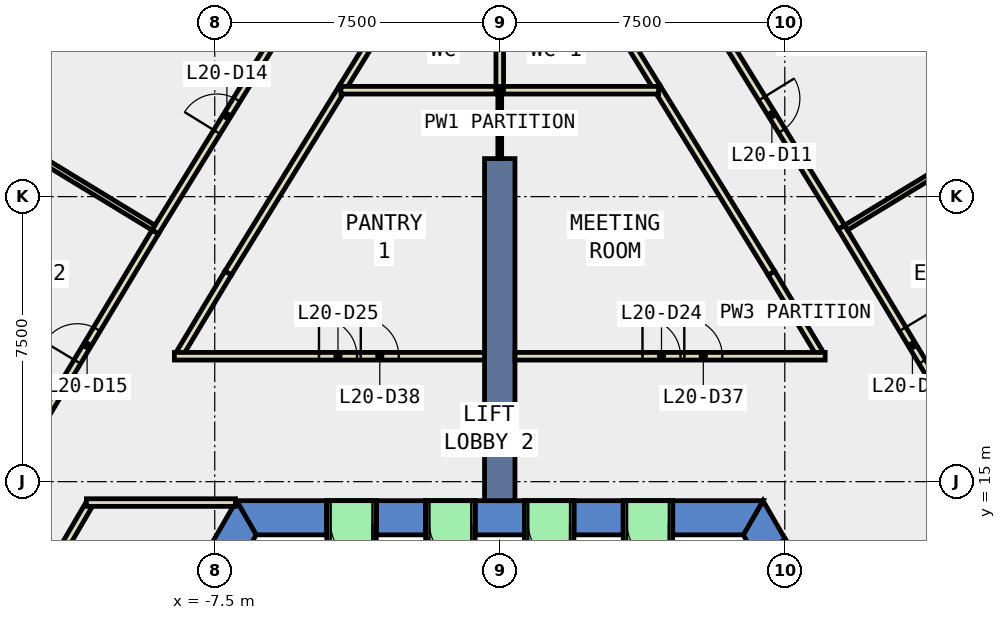
"""IFC4 building model, lengths in metres.
Left out: names, types, materials, properties, quantities, classifications, styles, units other than length and angle.
Written with IfcOpenShell. Run it as: python <this file> out.ifc"""

import sys

from ifc_helpers import new_model, si_unit, direction, frame, frame_2d, origin, place, context, subcontext, project, spatial, polyline, rectangle, outline, extrude, element, fill, save


model = new_model("IFC4")
c1 = context("Model", 3, precision=1e-05, world=origin(), true_north=direction((0.0, 1.0)))
c2 = subcontext(c1, "Body", "Model", "MODEL_VIEW")
j1 = project(units=[si_unit("LENGTHUNIT", "METRE"), si_unit("PLANEANGLEUNIT", "RADIAN")], contexts=[c1])
p1 = place(None, origin())
s1 = spatial("IfcSite", under=j1, at=p1, CompositionType="ELEMENT")
p2 = place(p1, origin())
s2 = spatial("IfcBuilding", under=s1, at=p2, CompositionType="ELEMENT")
p3 = place(p2, frame((0.0, 0.0, 95.0)))
s3 = spatial("IfcBuildingStorey", under=s2, at=p3, CompositionType="ELEMENT", Elevation=95.0)
p4 = place(p3, frame((0.0, 0.0, -0.4)))
e1 = element("IfcWall", 1, at=p4, inside=s3, PredefinedType="SHEAR", context=c2, shape_type="SweptSolid", body=[
    extrude(outline(polyline([(6.738, 13.03), (7.517, 13.48), (6.928, 14.5), (6.409, 13.6), (6.738, 13.03)])), origin(), (0.0, 0.0, 1.0), 4.2),
])
p5 = place(p3, frame((0.0, 0.0, 3.6)))
e2 = element("IfcWall", 2, at=p5, inside=s3, PredefinedType="SHEAR", context=c2, shape_type="SweptSolid", body=[
    extrude(outline(polyline([(7.517, 13.48), (6.738, 13.03), (7.738, 11.298), (8.517, 11.748), (7.517, 13.48)])), origin(), (0.0, 0.0, 1.0), 0.2),
])
p6 = place(p3, frame((0.0, 0.0, -0.4)))
e3 = element("IfcWall", 3, at=p6, inside=s3, PredefinedType="SHEAR", context=c2, shape_type="SweptSolid", body=[
    extrude(outline(polyline([(4.55, 14.5), (4.55, 13.6), (6.409, 13.6), (6.928, 14.5), (4.55, 14.5)])), origin(), (0.0, 0.0, 1.0), 4.2),
])
p7 = place(p3, frame((0.0, 0.0, -0.4)))
e4 = element("IfcWall", 4, at=p7, inside=s3, PredefinedType="SHEAR", context=c2, shape_type="SweptSolid", body=[
    extrude(outline(polyline([(1.95, 14.5), (1.95, 13.6), (3.25, 13.6), (3.25, 14.5), (1.95, 14.5)])), origin(), (0.0, 0.0, 1.0), 4.2),
])
p8 = place(p3, frame((0.0, 0.0, -0.4)))
e5 = element("IfcWall", 5, at=p8, inside=s3, PredefinedType="SHEAR", context=c2, shape_type="SweptSolid", body=[
    extrude(outline(polyline([(-0.65, 14.5), (-0.65, 13.6), (0.65, 13.6), (0.65, 14.5), (-0.65, 14.5)])), origin(), (0.0, 0.0, 1.0), 4.2),
])
p9 = place(p3, frame((0.0, 0.0, -0.4)))
e6 = element("IfcWall", 6, at=p9, inside=s3, PredefinedType="SHEAR", context=c2, shape_type="SweptSolid", body=[
    extrude(outline(polyline([(-3.25, 14.5), (-3.25, 13.6), (-1.95, 13.6), (-1.95, 14.5), (-3.25, 14.5)])), origin(), (0.0, 0.0, 1.0), 4.2),
])
p10 = place(p3, frame((0.0, 0.0, -0.4)))
e7 = element("IfcWall", 7, at=p10, inside=s3, PredefinedType="SHEAR", context=c2, shape_type="SweptSolid", body=[
    extrude(outline(polyline([(-4.55, 13.6), (-4.55, 14.5), (-6.928, 14.5), (-6.409, 13.6), (-4.55, 13.6)])), origin(), (0.0, 0.0, 1.0), 4.2),
])
p11 = place(p3, frame((0.0, 0.0, 3.6)))
e8 = element("IfcWall", 8, at=p11, inside=s3, PredefinedType="SHEAR", context=c2, shape_type="SweptSolid", body=[
    extrude(outline(polyline([(3.25, 14.5), (3.25, 13.6), (4.55, 13.6), (4.55, 14.5), (3.25, 14.5)])), origin(), (0.0, 0.0, 1.0), 0.2),
])
p12 = place(p3, frame((0.0, 0.0, 3.6)))
e9 = element("IfcWall", 9, at=p12, inside=s3, PredefinedType="SHEAR", context=c2, shape_type="SweptSolid", body=[
    extrude(outline(polyline([(0.65, 14.5), (0.65, 13.6), (1.95, 13.6), (1.95, 14.5), (0.65, 14.5)])), origin(), (0.0, 0.0, 1.0), 0.2),
])
p13 = place(p3, frame((0.0, 0.0, 3.6)))
e10 = element("IfcWall", 10, at=p13, inside=s3, PredefinedType="SHEAR", context=c2, shape_type="SweptSolid", body=[
    extrude(outline(polyline([(-1.95, 14.5), (-1.95, 13.6), (-0.65, 13.6), (-0.65, 14.5), (-1.95, 14.5)])), origin(), (0.0, 0.0, 1.0), 0.2),
])
p14 = place(p3, frame((0.0, 0.0, 3.6)))
e11 = element("IfcWall", 11, at=p14, inside=s3, PredefinedType="SHEAR", context=c2, shape_type="SweptSolid", body=[
    extrude(outline(polyline([(-4.55, 14.5), (-4.55, 13.6), (-3.25, 13.6), (-3.25, 14.5), (-4.55, 14.5)])), origin(), (0.0, 0.0, 1.0), 0.2),
])
p15 = place(p3, frame((0.0, 0.0, -0.4)))
e12 = element("IfcWall", 12, at=p15, inside=s3, PredefinedType="SHEAR", context=c2, shape_type="SweptSolid", body=[
    extrude(outline(polyline([(-12.267, 5.252), (-11.488, 4.802), (-6.409, 13.6), (-6.928, 14.5), (-12.267, 5.252)])), origin(), (0.0, 0.0, 1.0), 4.2),
])
p16 = place(p3, frame((0.0, 14.5, -0.4), z_axis=(0.0, 0.0, 1.0), x_axis=(0.0, 1.0, 0.0)))
e13 = element("IfcWall", 13, at=p16, inside=s3, PredefinedType="SHEAR", context=c2, shape_type="SweptSolid", body=[
    extrude(rectangle(XDim=9.0, YDim=0.8, at=frame_2d((4.5, 0.0))), origin(), (0.0, 0.0, 1.0), 4.2),
])
p17 = place(p3, frame((-11.814, 31.112, 0.0), z_axis=(0.0, 0.0, 1.0), x_axis=(-0.525204788886, -0.850975869065, 0.0)))
e14 = element("IfcWall", 14, at=p17, inside=s3, PredefinedType="STANDARD", context=c2, shape_type="SweptSolid", body=[
    extrude(rectangle(XDim=6.099, YDim=0.3, at=frame_2d((3.049, 0.0))), origin(), (0.0, 0.0, 1.0), 3.8),
])
p18 = place(p17, frame((0.525, 0.0, 0.9)))
e15 = element("IfcOpeningElement", 15, at=p18, cuts=e14, PredefinedType="OPENING", context=c2, shape_type="SweptSolid", body=[
    extrude(rectangle(XDim=2.0, YDim=2.6, at=frame_2d((1.0, 1.3))), frame((0.0, 0.16, 0.0), z_axis=(0.0, -1.0, 0.0), x_axis=(1.0, 0.0, 0.0)), (0.0, 0.0, 1.0), 0.32),
])
p19 = place(p17, frame((3.574, 0.0, 0.9)))
e16 = element("IfcOpeningElement", 16, at=p19, cuts=e14, PredefinedType="OPENING", context=c2, shape_type="SweptSolid", body=[
    extrude(rectangle(XDim=2.0, YDim=2.6, at=frame_2d((1.0, 1.3))), frame((0.0, 0.16, 0.0), z_axis=(0.0, -1.0, 0.0), x_axis=(1.0, 0.0, 0.0)), (0.0, 0.0, 1.0), 0.32),
])
p20 = place(p3, frame((8.411, 18.386, 0.0), z_axis=(0.0, 0.0, 1.0), x_axis=(-0.515008089027, 0.857185317325, 0.0)))
e17 = element("IfcWall", 17, at=p20, inside=s3, PredefinedType="PARTITIONING", context=c2, shape_type="SweptSolid", body=[
    extrude(rectangle(XDim=2.452, YDim=0.2, at=frame_2d((1.226, 0.0))), origin(), (0.0, 0.0, 1.0), 3.8),
])
for number, where, z_axis, x_axis in (
    (18, (7.148, 20.488, 0.0), (0.0, 0.0, 1.0), (-0.525, 0.851, 0.0)),
    (19, (-4.126, 25.385, 0.0), (0.0, 0.0, 1.0), (-0.525, -0.851, 0.0)),
):
    element("IfcWall", number, at=place(p3, frame(where, z_axis=z_axis, x_axis=x_axis)), inside=s3, PredefinedType="PARTITIONING", context=c2, shape_type="SweptSolid", body=[
        extrude(rectangle(XDim=5.754, YDim=0.2, at=frame_2d((2.877, 0.0))), origin(), (0.0, 0.0, 1.0), 3.8),
    ])
p21 = place(p3, frame((-7.148, 20.488, 0.0), z_axis=(0.0, 0.0, 1.0), x_axis=(-0.515008089027, -0.857185317325, 0.0)))
e20 = element("IfcWall", 20, at=p21, inside=s3, PredefinedType="PARTITIONING", context=c2, shape_type="SweptSolid", body=[
    extrude(rectangle(XDim=2.452, YDim=0.2, at=frame_2d((1.226, 0.0))), origin(), (0.0, 0.0, 1.0), 3.8),
])
p22 = place(p3, frame((-10.797, 14.415, 0.0), z_axis=(0.0, 0.0, 1.0), x_axis=(-0.505008297342, -0.863114488128, 0.0)))
e21 = element("IfcWall", 21, at=p22, inside=s3, PredefinedType="PARTITIONING", context=c2, shape_type="SweptSolid", body=[
    extrude(rectangle(XDim=7.085, YDim=0.2, at=frame_2d((3.542, 0.0))), origin(), (0.0, 0.0, 1.0), 3.8),
])
p23 = place(p22, frame((3.043, 0.0, 0.0)))
e22 = element("IfcOpeningElement", 22, at=p23, cuts=e21, PredefinedType="OPENING", context=c2, shape_type="SweptSolid", body=[
    extrude(rectangle(XDim=1.0, YDim=2.1, at=frame_2d((0.5, 1.05))), frame((0.0, 0.11, 0.0), z_axis=(0.0, -1.0, 0.0), x_axis=(1.0, 0.0, 0.0)), (0.0, 0.0, 1.0), 0.22),
])
for number, where, z_axis, x_axis in (
    (23, (4.126, 25.385, 0.0), (0.0, 0.0, 1.0), (-0.525, 0.851, 0.0)),
    (24, (-3.428, 26.517, 0.0), (0.0, 0.0, 1.0), (-0.525, -0.851, 0.0)),
):
    element("IfcWall", number, at=place(p3, frame(where, z_axis=z_axis, x_axis=x_axis)), inside=s3, PredefinedType="PARTITIONING", context=c2, shape_type="SweptSolid", body=[
        extrude(rectangle(XDim=1.33, YDim=0.2, at=frame_2d((0.665, 0.0))), origin(), (0.0, 0.0, 1.0), 3.8),
    ])
p24 = place(p3, frame((8.989, 21.696, 0.0), z_axis=(0.0, 0.0, 1.0), x_axis=(0.515000602442, -0.857189815318, 0.0)))
e25 = element("IfcWall", 25, at=p24, inside=s3, PredefinedType="PARTITIONING", context=c2, shape_type="SweptSolid", body=[
    extrude(rectangle(XDim=7.11, YDim=0.2, at=frame_2d((3.555, 0.0))), origin(), (0.0, 0.0, 1.0), 3.8),
])
p25 = place(p24, frame((3.13, 0.0, 0.0)))
e26 = element("IfcOpeningElement", 26, at=p25, cuts=e25, PredefinedType="OPENING", context=c2, shape_type="SweptSolid", body=[
    extrude(rectangle(XDim=1.0, YDim=2.1, at=frame_2d((0.5, 1.05))), frame((0.0, 0.11, 0.0), z_axis=(0.0, -1.0, 0.0), x_axis=(1.0, 0.0, 0.0)), (0.0, 0.0, 1.0), 0.22),
])
p26 = place(p3, frame((5.254, 27.747, 0.0), z_axis=(0.0, 0.0, 1.0), x_axis=(0.52516023635, -0.851003364363, 0.0)))
e27 = element("IfcWall", 27, at=p26, inside=s3, PredefinedType="PARTITIONING", context=c2, shape_type="SweptSolid", body=[
    extrude(rectangle(XDim=7.11, YDim=0.2, at=frame_2d((3.555, 0.0))), origin(), (0.0, 0.0, 1.0), 3.8),
])
p27 = place(p26, frame((3.13, 0.0, 0.0)))
e28 = element("IfcOpeningElement", 28, at=p27, cuts=e27, PredefinedType="OPENING", context=c2, shape_type="SweptSolid", body=[
    extrude(rectangle(XDim=1.0, YDim=2.1, at=frame_2d((0.5, 1.05))), frame((0.0, 0.11, 0.0), z_axis=(0.0, -1.0, 0.0), x_axis=(1.0, 0.0, 0.0)), (0.0, 0.0, 1.0), 0.22),
])
p28 = place(p3, frame((-9.067, 21.568, 0.0), z_axis=(0.0, 0.0, 1.0), x_axis=(0.525131931126, 0.851020831068, 0.0)))
e29 = element("IfcWall", 29, at=p28, inside=s3, PredefinedType="PARTITIONING", context=c2, shape_type="SweptSolid", body=[
    extrude(rectangle(XDim=7.187, YDim=0.2, at=frame_2d((3.593, 0.0))), origin(), (0.0, 0.0, 1.0), 3.8),
])
p29 = place(p28, frame((3.093, 0.0, 0.0)))
e30 = element("IfcOpeningElement", 30, at=p29, cuts=e29, PredefinedType="OPENING", context=c2, shape_type="SweptSolid", body=[
    extrude(rectangle(XDim=1.0, YDim=2.1, at=frame_2d((0.5, 1.05))), frame((0.0, 0.11, 0.0), z_axis=(0.0, -1.0, 0.0), x_axis=(1.0, 0.0, 0.0)), (0.0, 0.0, 1.0), 0.22),
])
p30 = place(p3, frame((-12.728, 15.473, 0.0), z_axis=(0.0, 0.0, 1.0), x_axis=(0.515010673306, 0.857183764651, 0.0)))
e31 = element("IfcWall", 31, at=p30, inside=s3, PredefinedType="PARTITIONING", context=c2, shape_type="SweptSolid", body=[
    extrude(rectangle(XDim=7.111, YDim=0.2, at=frame_2d((3.555, 0.0))), origin(), (0.0, 0.0, 1.0), 3.8),
])
p31 = place(p30, frame((3.13, 0.0, 0.0)))
e32 = element("IfcOpeningElement", 32, at=p31, cuts=e31, PredefinedType="OPENING", context=c2, shape_type="SweptSolid", body=[
    extrude(rectangle(XDim=1.0, YDim=2.1, at=frame_2d((0.5, 1.05))), frame((0.0, 0.11, 0.0), z_axis=(0.0, -1.0, 0.0), x_axis=(1.0, 0.0, 0.0)), (0.0, 0.0, 1.0), 0.22),
])
p32 = place(p3, frame((0.4, 18.3, 0.0), z_axis=(0.0, 0.0, 1.0), x_axis=(1.0, 0.0, 0.0)))
e33 = element("IfcWall", 33, at=p32, inside=s3, PredefinedType="PARTITIONING", context=c2, shape_type="SweptSolid", body=[
    extrude(rectangle(XDim=8.163, YDim=0.2, at=frame_2d((4.082, 0.0))), origin(), (0.0, 0.0, 1.0), 3.8),
])
p33 = place(p32, frame((3.356, 0.0, 0.0)))
e34 = element("IfcOpeningElement", 34, at=p33, cuts=e33, PredefinedType="OPENING", context=c2, shape_type="SweptSolid", body=[
    extrude(rectangle(XDim=1.0, YDim=2.1, at=frame_2d((0.5, 1.05))), frame((0.0, 0.11, 0.0), z_axis=(0.0, -1.0, 0.0), x_axis=(1.0, 0.0, 0.0)), (0.0, 0.0, 1.0), 0.22),
])
p34 = place(p32, frame((4.456, 0.0, 0.0)))
e35 = element("IfcOpeningElement", 35, at=p34, cuts=e33, PredefinedType="OPENING", context=c2, shape_type="SweptSolid", body=[
    extrude(rectangle(XDim=1.0, YDim=2.1, at=frame_2d((0.5, 1.05))), frame((0.0, 0.11, 0.0), z_axis=(0.0, -1.0, 0.0), x_axis=(1.0, 0.0, 0.0)), (0.0, 0.0, 1.0), 0.22),
])
p35 = place(p3, frame((-8.563, 18.3, 0.0), z_axis=(0.0, 0.0, 1.0), x_axis=(1.0, 0.0, 0.0)))
e36 = element("IfcWall", 36, at=p35, inside=s3, PredefinedType="PARTITIONING", context=c2, shape_type="SweptSolid", body=[
    extrude(rectangle(XDim=8.163, YDim=0.2, at=frame_2d((4.082, 0.0))), origin(), (0.0, 0.0, 1.0), 3.8),
])
p36 = place(p35, frame((3.806, 0.0, 0.0)))
e37 = element("IfcOpeningElement", 37, at=p36, cuts=e36, PredefinedType="OPENING", context=c2, shape_type="SweptSolid", body=[
    extrude(rectangle(XDim=1.0, YDim=2.1, at=frame_2d((0.5, 1.05))), frame((0.0, 0.11, 0.0), z_axis=(0.0, -1.0, 0.0), x_axis=(1.0, 0.0, 0.0)), (0.0, 0.0, 1.0), 0.22),
])
p37 = place(p35, frame((4.906, 0.0, 0.0)))
e38 = element("IfcOpeningElement", 38, at=p37, cuts=e36, PredefinedType="OPENING", context=c2, shape_type="SweptSolid", body=[
    extrude(rectangle(XDim=1.0, YDim=2.1, at=frame_2d((0.5, 1.05))), frame((0.0, 0.11, 0.0), z_axis=(0.0, -1.0, 0.0), x_axis=(1.0, 0.0, 0.0)), (0.0, 0.0, 1.0), 0.22),
])
p38 = place(p3, frame((-6.957, 14.45, 0.0), z_axis=(0.0, 0.0, 1.0), x_axis=(-1.0, 0.0, 0.0)))
e39 = element("IfcWall", 39, at=p38, inside=s3, PredefinedType="PARTITIONING", context=c2, shape_type="SweptSolid", body=[
    extrude(rectangle(XDim=3.92, YDim=0.2, at=frame_2d((1.96, 0.0))), origin(), (0.0, 0.0, 1.0), 3.8),
])
p39 = place(p3, frame((0.0, 23.5, 0.0), z_axis=(0.0, 0.0, 1.0), x_axis=(0.0, 1.0, 0.0)))
e40 = element("IfcWall", 40, at=p39, inside=s3, PredefinedType="PARTITIONING", context=c2, shape_type="SweptSolid", body=[
    extrude(rectangle(XDim=1.9, YDim=0.1, at=frame_2d((0.95, 0.0))), origin(), (0.0, 0.0, 1.0), 3.8),
])
for number, where, z_axis, x_axis in (
    (41, (0.1, 25.3, 0.0), (0.0, 0.0, 1.0), (1.0, 0.0, 0.0)),
    (42, (-4.179, 25.3, 0.0), (0.0, 0.0, 1.0), (1.0, 0.0, 0.0)),
):
    element("IfcWall", number, at=place(p3, frame(where, z_axis=z_axis, x_axis=x_axis)), inside=s3, PredefinedType="PARTITIONING", context=c2, shape_type="SweptSolid", body=[
        extrude(rectangle(XDim=4.079, YDim=0.2, at=frame_2d((2.04, 0.0))), origin(), (0.0, 0.0, 1.0), 3.8),
    ])
p40 = place(p3, frame((0.0, 25.4, 0.0), z_axis=(0.0, 0.0, 1.0), x_axis=(0.0, 1.0, 0.0)))
e43 = element("IfcWall", 43, at=p40, inside=s3, PredefinedType="PARTITIONING", context=c2, shape_type="SweptSolid", body=[
    extrude(rectangle(XDim=6.453, YDim=0.2, at=frame_2d((3.227, 0.0))), origin(), (0.0, 0.0, 1.0), 3.8),
])
for number, where, z_axis, x_axis in (
    (44, (9.113, 21.684, 0.0), (0.0, 0.0, 1.0), (0.854, 0.52, 0.0)),
    (45, (-9.113, 21.684, 0.0), (0.0, 0.0, 1.0), (-0.854, 0.52, 0.0)),
):
    element("IfcWall", number, at=place(p3, frame(where, z_axis=z_axis, x_axis=x_axis)), inside=s3, PredefinedType="PARTITIONING", context=c2, shape_type="SweptSolid", body=[
        extrude(rectangle(XDim=5.729, YDim=0.15, at=frame_2d((2.865, 0.0))), origin(), (0.0, 0.0, 1.0), 3.8),
    ])
p41 = place(p3, frame((8.43, 11.698, 0.0), z_axis=(0.0, 0.0, 1.0), x_axis=(-0.50002537861, 0.866010750942, 0.0)))
e46 = element("IfcWall", 46, at=p41, inside=s3, PredefinedType="PARTITIONING", context=c2, shape_type="SweptSolid", body=[
    extrude(rectangle(XDim=2.0, YDim=0.2, at=frame_2d((1.0, 0.0))), origin(), (0.0, 0.0, 1.0), 2.4),
])
p42 = place(p41, frame((0.19, 0.0, 0.0)))
e47 = element("IfcOpeningElement", 47, at=p42, cuts=e46, PredefinedType="OPENING", context=c2, shape_type="SweptSolid", body=[
    extrude(rectangle(XDim=1.8, YDim=2.1, at=frame_2d((0.9, 1.05))), frame((0.0, 0.11, 0.0), z_axis=(0.0, -1.0, 0.0), x_axis=(1.0, 0.0, 0.0)), (0.0, 0.0, 1.0), 0.22),
])
p43 = place(p3, frame((4.55, 13.9, 0.0), z_axis=(0.0, 0.0, 1.0), x_axis=(-1.0, 0.0, 0.0)))
e48 = element("IfcWall", 48, at=p43, inside=s3, PredefinedType="STANDARD", context=c2, shape_type="SweptSolid", body=[
    extrude(rectangle(XDim=1.3, YDim=1.2, at=frame_2d((0.65, 0.0))), origin(), (0.0, 0.0, 1.0), 2.4),
])
p44 = place(p43, frame((0.1, 0.0, 0.0)))
e49 = element("IfcOpeningElement", 49, at=p44, cuts=e48, PredefinedType="OPENING", context=c2, shape_type="SweptSolid", body=[
    extrude(rectangle(XDim=1.1, YDim=2.3, at=frame_2d((0.55, 1.15))), frame((0.0, 0.61, 0.0), z_axis=(0.0, -1.0, 0.0), x_axis=(1.0, 0.0, 0.0)), (0.0, 0.0, 1.0), 1.22),
])
p45 = place(p3, frame((1.95, 13.9, 0.0), z_axis=(0.0, 0.0, 1.0), x_axis=(-1.0, 0.0, 0.0)))
e50 = element("IfcWall", 50, at=p45, inside=s3, PredefinedType="STANDARD", context=c2, shape_type="SweptSolid", body=[
    extrude(rectangle(XDim=1.3, YDim=1.2, at=frame_2d((0.65, 0.0))), origin(), (0.0, 0.0, 1.0), 2.4),
])
p46 = place(p45, frame((0.1, 0.0, 0.0)))
e51 = element("IfcOpeningElement", 51, at=p46, cuts=e50, PredefinedType="OPENING", context=c2, shape_type="SweptSolid", body=[
    extrude(rectangle(XDim=1.1, YDim=2.3, at=frame_2d((0.55, 1.15))), frame((0.0, 0.61, 0.0), z_axis=(0.0, -1.0, 0.0), x_axis=(1.0, 0.0, 0.0)), (0.0, 0.0, 1.0), 1.22),
])
p47 = place(p3, frame((-0.65, 13.9, 0.0), z_axis=(0.0, 0.0, 1.0), x_axis=(-1.0, 0.0, 0.0)))
e52 = element("IfcWall", 52, at=p47, inside=s3, PredefinedType="STANDARD", context=c2, shape_type="SweptSolid", body=[
    extrude(rectangle(XDim=1.3, YDim=1.2, at=frame_2d((0.65, 0.0))), origin(), (0.0, 0.0, 1.0), 2.4),
])
p48 = place(p47, frame((0.1, 0.0, 0.0)))
e53 = element("IfcOpeningElement", 53, at=p48, cuts=e52, PredefinedType="OPENING", context=c2, shape_type="SweptSolid", body=[
    extrude(rectangle(XDim=1.1, YDim=2.3, at=frame_2d((0.55, 1.15))), frame((0.0, 0.61, 0.0), z_axis=(0.0, -1.0, 0.0), x_axis=(1.0, 0.0, 0.0)), (0.0, 0.0, 1.0), 1.22),
])
p49 = place(p3, frame((-3.25, 13.9, 0.0), z_axis=(0.0, 0.0, 1.0), x_axis=(-1.0, 0.0, 0.0)))
e54 = element("IfcWall", 54, at=p49, inside=s3, PredefinedType="STANDARD", context=c2, shape_type="SweptSolid", body=[
    extrude(rectangle(XDim=1.3, YDim=1.2, at=frame_2d((0.65, 0.0))), origin(), (0.0, 0.0, 1.0), 2.4),
])
p50 = place(p49, frame((0.1, 0.0, 0.0)))
e55 = element("IfcOpeningElement", 55, at=p50, cuts=e54, PredefinedType="OPENING", context=c2, shape_type="SweptSolid", body=[
    extrude(rectangle(XDim=1.1, YDim=2.3, at=frame_2d((0.55, 1.15))), frame((0.0, 0.61, 0.0), z_axis=(0.0, -1.0, 0.0), x_axis=(1.0, 0.0, 0.0)), (0.0, 0.0, 1.0), 1.22),
])
p51 = place(p25, origin())
e56 = element("IfcDoor", 56, at=p51, inside=s3, OperationType="SINGLE_SWING_LEFT", PredefinedType="DOOR", context=c2, shape_type="SweptSolid", body=[
    extrude(rectangle(XDim=1.0, YDim=2.1, at=frame_2d((0.5, 1.05))), frame((0.0, 0.025, 0.0), z_axis=(0.0, -1.0, 0.0), x_axis=(1.0, 0.0, 0.0)), (0.0, 0.0, 1.0), 0.05),
])
fill(e26, e56)
p52 = place(p27, origin())
e57 = element("IfcDoor", 57, at=p52, inside=s3, OperationType="SINGLE_SWING_LEFT", PredefinedType="DOOR", context=c2, shape_type="SweptSolid", body=[
    extrude(rectangle(XDim=1.0, YDim=2.1, at=frame_2d((0.5, 1.05))), frame((0.0, 0.025, 0.0), z_axis=(0.0, -1.0, 0.0), x_axis=(1.0, 0.0, 0.0)), (0.0, 0.0, 1.0), 0.05),
])
fill(e28, e57)
p53 = place(p29, origin())
e58 = element("IfcDoor", 58, at=p53, inside=s3, OperationType="SINGLE_SWING_RIGHT", PredefinedType="DOOR", context=c2, shape_type="SweptSolid", body=[
    extrude(rectangle(XDim=1.0, YDim=2.1, at=frame_2d((0.5, 1.05))), frame((0.0, 0.025, 0.0), z_axis=(0.0, -1.0, 0.0), x_axis=(1.0, 0.0, 0.0)), (0.0, 0.0, 1.0), 0.05),
])
fill(e30, e58)
p54 = place(p31, origin())
e59 = element("IfcDoor", 59, at=p54, inside=s3, OperationType="SINGLE_SWING_LEFT", PredefinedType="DOOR", context=c2, shape_type="SweptSolid", body=[
    extrude(rectangle(XDim=1.0, YDim=2.1, at=frame_2d((0.5, 1.05))), frame((0.0, 0.025, 0.0), z_axis=(0.0, -1.0, 0.0), x_axis=(1.0, 0.0, 0.0)), (0.0, 0.0, 1.0), 0.05),
])
fill(e32, e59)
p55 = place(p33, origin())
e60 = element("IfcDoor", 60, at=p55, inside=s3, OperationType="SINGLE_SWING_RIGHT", PredefinedType="DOOR", context=c2, shape_type="SweptSolid", body=[
    extrude(rectangle(XDim=1.0, YDim=2.1, at=frame_2d((0.5, 1.05))), frame((0.0, 0.025, 0.0), z_axis=(0.0, -1.0, 0.0), x_axis=(1.0, 0.0, 0.0)), (0.0, 0.0, 1.0), 0.05),
])
fill(e34, e60)
p56 = place(p36, origin())
e61 = element("IfcDoor", 61, at=p56, inside=s3, OperationType="SINGLE_SWING_RIGHT", PredefinedType="DOOR", context=c2, shape_type="SweptSolid", body=[
    extrude(rectangle(XDim=1.0, YDim=2.1, at=frame_2d((0.5, 1.05))), frame((0.0, 0.025, 0.0), z_axis=(0.0, -1.0, 0.0), x_axis=(1.0, 0.0, 0.0)), (0.0, 0.0, 1.0), 0.05),
])
fill(e37, e61)
p57 = place(p34, origin())
e62 = element("IfcDoor", 62, at=p57, inside=s3, OperationType="SINGLE_SWING_RIGHT", PredefinedType="DOOR", context=c2, shape_type="SweptSolid", body=[
    extrude(rectangle(XDim=1.0, YDim=2.1, at=frame_2d((0.5, 1.05))), frame((0.0, 0.025, 0.0), z_axis=(0.0, -1.0, 0.0), x_axis=(1.0, 0.0, 0.0)), (0.0, 0.0, 1.0), 0.05),
])
fill(e35, e62)
p58 = place(p37, origin())
e63 = element("IfcDoor", 63, at=p58, inside=s3, OperationType="SINGLE_SWING_RIGHT", PredefinedType="DOOR", context=c2, shape_type="SweptSolid", body=[
    extrude(rectangle(XDim=1.0, YDim=2.1, at=frame_2d((0.5, 1.05))), frame((0.0, 0.025, 0.0), z_axis=(0.0, -1.0, 0.0), x_axis=(1.0, 0.0, 0.0)), (0.0, 0.0, 1.0), 0.05),
])
fill(e38, e63)
p59 = place(p44, origin())
e64 = element("IfcDoor", 64, at=p59, inside=s3, OperationType="SLIDING_TO_LEFT", PredefinedType="DOOR", context=c2, shape_type="SweptSolid", body=[
    extrude(rectangle(XDim=1.1, YDim=2.3, at=frame_2d((0.55, 1.15))), frame((0.0, 0.025, 0.0), z_axis=(0.0, -1.0, 0.0), x_axis=(1.0, 0.0, 0.0)), (0.0, 0.0, 1.0), 0.05),
])
fill(e49, e64)
p60 = place(p46, origin())
e65 = element("IfcDoor", 65, at=p60, inside=s3, OperationType="SLIDING_TO_LEFT", PredefinedType="DOOR", context=c2, shape_type="SweptSolid", body=[
    extrude(rectangle(XDim=1.1, YDim=2.3, at=frame_2d((0.55, 1.15))), frame((0.0, 0.025, 0.0), z_axis=(0.0, -1.0, 0.0), x_axis=(1.0, 0.0, 0.0)), (0.0, 0.0, 1.0), 0.05),
])
fill(e51, e65)
p61 = place(p48, origin())
e66 = element("IfcDoor", 66, at=p61, inside=s3, OperationType="SLIDING_TO_LEFT", PredefinedType="DOOR", context=c2, shape_type="SweptSolid", body=[
    extrude(rectangle(XDim=1.1, YDim=2.3, at=frame_2d((0.55, 1.15))), frame((0.0, 0.025, 0.0), z_axis=(0.0, -1.0, 0.0), x_axis=(1.0, 0.0, 0.0)), (0.0, 0.0, 1.0), 0.05),
])
fill(e53, e66)
p62 = place(p50, origin())
e67 = element("IfcDoor", 67, at=p62, inside=s3, OperationType="SLIDING_TO_LEFT", PredefinedType="DOOR", context=c2, shape_type="SweptSolid", body=[
    extrude(rectangle(XDim=1.1, YDim=2.3, at=frame_2d((0.55, 1.15))), frame((0.0, 0.025, 0.0), z_axis=(0.0, -1.0, 0.0), x_axis=(1.0, 0.0, 0.0)), (0.0, 0.0, 1.0), 0.05),
])
fill(e55, e67)
save(model, sys.argv[1])
